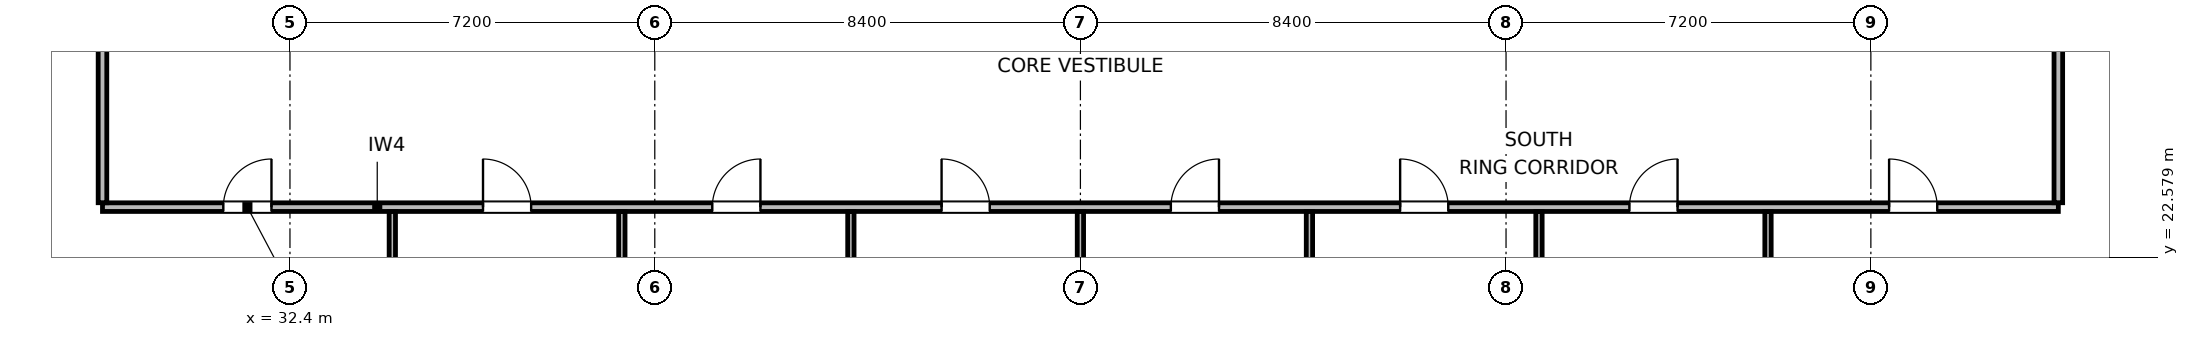
"""IFC4 building model, lengths in metres.
Left out: names, types, materials, properties, quantities, classifications, styles, units other than length and angle.
Written with IfcOpenShell. Run it as: python <this file> out.ifc"""

import sys

from ifc_helpers import new_model, si_unit, direction, frame, frame_2d, origin, place, context, subcontext, project, spatial, rectangle, extrude, element, fill, save


model = new_model("IFC4")
c1 = context("Model", 3, precision=1e-05, world=origin(), true_north=direction((0.0, 1.0)))
c2 = subcontext(c1, "Body", "Model", "MODEL_VIEW")
j1 = project(units=[si_unit("LENGTHUNIT", "METRE"), si_unit("PLANEANGLEUNIT", "RADIAN")], contexts=[c1])
p1 = place(None, origin())
s1 = spatial("IfcSite", under=j1, at=p1, CompositionType="ELEMENT")
p2 = place(p1, origin())
s2 = spatial("IfcBuilding", under=s1, at=p2, CompositionType="ELEMENT")
p3 = place(p2, frame((0.0, 0.0, 109.2)))
s3 = spatial("IfcBuildingStorey", under=s2, at=p3, CompositionType="ELEMENT", Elevation=109.2)
p4 = place(p3, frame((28.7, 23.57, 0.0), z_axis=(0.0, 0.0, 1.0), x_axis=(1.0, 0.0, 0.0)))
e1 = element("IfcWall", 1, at=p4, inside=s3, PredefinedType="PARTITIONING", context=c2, shape_type="SweptSolid", body=[
    extrude(rectangle(XDim=38.6, YDim=0.17, at=frame_2d((19.3, 0.0))), origin(), (0.0, 0.0, 1.0), 3.64),
])
p5 = place(p4, frame((2.385, 0.0, 0.0)))
e2 = element("IfcOpeningElement", 2, at=p5, cuts=e1, PredefinedType="OPENING", context=c2, shape_type="SweptSolid", body=[
    extrude(rectangle(XDim=0.95, YDim=2.04, at=frame_2d((0.475, 1.02))), frame((0.0, 0.095, 0.0), z_axis=(0.0, -1.0, 0.0), x_axis=(1.0, 0.0, 0.0)), (0.0, 0.0, 1.0), 0.19),
])
p6 = place(p4, frame((7.51, 0.0, 0.0)))
e3 = element("IfcOpeningElement", 3, at=p6, cuts=e1, PredefinedType="OPENING", context=c2, shape_type="SweptSolid", body=[
    extrude(rectangle(XDim=0.95, YDim=2.04, at=frame_2d((0.475, 1.02))), frame((0.0, 0.095, 0.0), z_axis=(0.0, -1.0, 0.0), x_axis=(1.0, 0.0, 0.0)), (0.0, 0.0, 1.0), 0.19),
])
p7 = place(p4, frame((12.035, 0.0, 0.0)))
e4 = element("IfcOpeningElement", 4, at=p7, cuts=e1, PredefinedType="OPENING", context=c2, shape_type="SweptSolid", body=[
    extrude(rectangle(XDim=0.95, YDim=2.04, at=frame_2d((0.475, 1.02))), frame((0.0, 0.095, 0.0), z_axis=(0.0, -1.0, 0.0), x_axis=(1.0, 0.0, 0.0)), (0.0, 0.0, 1.0), 0.19),
])
p8 = place(p4, frame((16.56, 0.0, 0.0)))
e5 = element("IfcOpeningElement", 5, at=p8, cuts=e1, PredefinedType="OPENING", context=c2, shape_type="SweptSolid", body=[
    extrude(rectangle(XDim=0.95, YDim=2.04, at=frame_2d((0.475, 1.02))), frame((0.0, 0.095, 0.0), z_axis=(0.0, -1.0, 0.0), x_axis=(1.0, 0.0, 0.0)), (0.0, 0.0, 1.0), 0.19),
])
p9 = place(p4, frame((21.085, 0.0, 0.0)))
e6 = element("IfcOpeningElement", 6, at=p9, cuts=e1, PredefinedType="OPENING", context=c2, shape_type="SweptSolid", body=[
    extrude(rectangle(XDim=0.95, YDim=2.04, at=frame_2d((0.475, 1.02))), frame((0.0, 0.095, 0.0), z_axis=(0.0, -1.0, 0.0), x_axis=(1.0, 0.0, 0.0)), (0.0, 0.0, 1.0), 0.19),
])
p10 = place(p4, frame((25.61, 0.0, 0.0)))
e7 = element("IfcOpeningElement", 7, at=p10, cuts=e1, PredefinedType="OPENING", context=c2, shape_type="SweptSolid", body=[
    extrude(rectangle(XDim=0.95, YDim=2.04, at=frame_2d((0.475, 1.02))), frame((0.0, 0.095, 0.0), z_axis=(0.0, -1.0, 0.0), x_axis=(1.0, 0.0, 0.0)), (0.0, 0.0, 1.0), 0.19),
])
p11 = place(p4, frame((30.135, 0.0, 0.0)))
e8 = element("IfcOpeningElement", 8, at=p11, cuts=e1, PredefinedType="OPENING", context=c2, shape_type="SweptSolid", body=[
    extrude(rectangle(XDim=0.95, YDim=2.04, at=frame_2d((0.475, 1.02))), frame((0.0, 0.095, 0.0), z_axis=(0.0, -1.0, 0.0), x_axis=(1.0, 0.0, 0.0)), (0.0, 0.0, 1.0), 0.19),
])
p12 = place(p4, frame((35.26, 0.0, 0.0)))
e9 = element("IfcOpeningElement", 9, at=p12, cuts=e1, PredefinedType="OPENING", context=c2, shape_type="SweptSolid", body=[
    extrude(rectangle(XDim=0.95, YDim=2.04, at=frame_2d((0.475, 1.02))), frame((0.0, 0.095, 0.0), z_axis=(0.0, -1.0, 0.0), x_axis=(1.0, 0.0, 0.0)), (0.0, 0.0, 1.0), 0.19),
])
p13 = place(p3, frame((28.7, 23.657, 0.0), z_axis=(0.0, 0.0, 1.0), x_axis=(0.0, 1.0, 0.0)))
e10 = element("IfcWall", 10, at=p13, inside=s3, PredefinedType="PARTITIONING", context=c2, shape_type="SweptSolid", body=[
    extrude(rectangle(XDim=24.686, YDim=0.17, at=frame_2d((12.343, 0.0))), origin(), (0.0, 0.0, 1.0), 3.64),
])
p14 = place(p13, frame((5.253, 0.0, 0.0)))
e11 = element("IfcOpeningElement", 11, at=p14, cuts=e10, PredefinedType="OPENING", context=c2, shape_type="SweptSolid", body=[
    extrude(rectangle(XDim=0.95, YDim=2.04, at=frame_2d((0.475, 1.02))), frame((0.0, 0.095, 0.0), z_axis=(0.0, -1.0, 0.0), x_axis=(1.0, 0.0, 0.0)), (0.0, 0.0, 1.0), 0.19),
])
p15 = place(p13, frame((17.683, 0.0, 0.0)))
e12 = element("IfcOpeningElement", 12, at=p15, cuts=e10, PredefinedType="OPENING", context=c2, shape_type="SweptSolid", body=[
    extrude(rectangle(XDim=0.95, YDim=2.04, at=frame_2d((0.475, 1.02))), frame((0.0, 0.095, 0.0), z_axis=(0.0, -1.0, 0.0), x_axis=(1.0, 0.0, 0.0)), (0.0, 0.0, 1.0), 0.19),
])
p16 = place(p3, frame((67.3, 23.657, 0.0), z_axis=(0.0, 0.0, 1.0), x_axis=(0.0, 1.0, 0.0)))
e13 = element("IfcWall", 13, at=p16, inside=s3, PredefinedType="PARTITIONING", context=c2, shape_type="SweptSolid", body=[
    extrude(rectangle(XDim=24.686, YDim=0.17, at=frame_2d((12.343, 0.0))), origin(), (0.0, 0.0, 1.0), 3.64),
])
p17 = place(p16, frame((5.153, 0.0, 0.0)))
e14 = element("IfcOpeningElement", 14, at=p17, cuts=e13, PredefinedType="OPENING", context=c2, shape_type="SweptSolid", body=[
    extrude(rectangle(XDim=0.95, YDim=2.04, at=frame_2d((0.475, 1.02))), frame((0.0, 0.095, 0.0), z_axis=(0.0, -1.0, 0.0), x_axis=(1.0, 0.0, 0.0)), (0.0, 0.0, 1.0), 0.19),
])
p18 = place(p16, frame((17.583, 0.0, 0.0)))
e15 = element("IfcOpeningElement", 15, at=p18, cuts=e13, PredefinedType="OPENING", context=c2, shape_type="SweptSolid", body=[
    extrude(rectangle(XDim=0.95, YDim=2.04, at=frame_2d((0.475, 1.02))), frame((0.0, 0.095, 0.0), z_axis=(0.0, -1.0, 0.0), x_axis=(1.0, 0.0, 0.0)), (0.0, 0.0, 1.0), 0.19),
])
for number, where, z_axis, x_axis in (
    (16, (34.42, 9.915, 0.0), (0.0, 0.0, 1.0), (0.0, 1.0, 0.0)),
    (17, (38.95, 9.915, 0.0), (0.0, 0.0, 1.0), (0.0, 1.0, 0.0)),
):
    element("IfcWall", number, at=place(p3, frame(where, z_axis=z_axis, x_axis=x_axis)), inside=s3, PredefinedType="PARTITIONING", context=c2, shape_type="SweptSolid", body=[
        extrude(rectangle(XDim=13.568, YDim=0.125, at=frame_2d((6.784, 0.0))), origin(), (0.0, 0.0, 1.0), 3.64),
    ])
p19 = place(p3, frame((43.47, 13.575, 0.0), z_axis=(0.0, 0.0, 1.0), x_axis=(0.0, 1.0, 0.0)))
e18 = element("IfcWall", 18, at=p19, inside=s3, PredefinedType="PARTITIONING", context=c2, shape_type="SweptSolid", body=[
    extrude(rectangle(XDim=9.908, YDim=0.125, at=frame_2d((4.954, 0.0))), origin(), (0.0, 0.0, 1.0), 3.003),
])
p20 = place(p3, frame((48.0, 11.515, 0.0), z_axis=(0.0, 0.0, 1.0), x_axis=(0.0, 1.0, 0.0)))
e19 = element("IfcWall", 19, at=p20, inside=s3, PredefinedType="PARTITIONING", context=c2, shape_type="SweptSolid", body=[
    extrude(rectangle(XDim=11.968, YDim=0.125, at=frame_2d((5.984, 0.0))), origin(), (0.0, 0.0, 1.0), 3.003),
])
p21 = place(p3, frame((52.52, 11.223, 0.0), z_axis=(0.0, 0.0, 1.0), x_axis=(0.0, 1.0, 0.0)))
e20 = element("IfcWall", 20, at=p21, inside=s3, PredefinedType="PARTITIONING", context=c2, shape_type="SweptSolid", body=[
    extrude(rectangle(XDim=12.26, YDim=0.125, at=frame_2d((6.13, 0.0))), origin(), (0.0, 0.0, 1.0), 3.003),
])
for number, where, z_axis, x_axis in (
    (21, (57.05, 9.915, 0.0), (0.0, 0.0, 1.0), (0.0, 1.0, 0.0)),
    (22, (61.57, 9.915, 0.0), (0.0, 0.0, 1.0), (0.0, 1.0, 0.0)),
):
    element("IfcWall", number, at=place(p3, frame(where, z_axis=z_axis, x_axis=x_axis)), inside=s3, PredefinedType="PARTITIONING", context=c2, shape_type="SweptSolid", body=[
        extrude(rectangle(XDim=13.568, YDim=0.125, at=frame_2d((6.784, 0.0))), origin(), (0.0, 0.0, 1.0), 3.64),
    ])
p22 = place(p5, origin())
e23 = element("IfcDoor", 23, at=p22, inside=s3, OperationType="SINGLE_SWING_RIGHT", PredefinedType="DOOR", context=c2, shape_type="SweptSolid", body=[
    extrude(rectangle(XDim=0.95, YDim=2.04, at=frame_2d((0.475, 1.02))), frame((0.0, 0.025, 0.0), z_axis=(0.0, -1.0, 0.0), x_axis=(1.0, 0.0, 0.0)), (0.0, 0.0, 1.0), 0.05),
])
fill(e2, e23)
p23 = place(p6, origin())
e24 = element("IfcDoor", 24, at=p23, inside=s3, OperationType="SINGLE_SWING_LEFT", PredefinedType="DOOR", context=c2, shape_type="SweptSolid", body=[
    extrude(rectangle(XDim=0.95, YDim=2.04, at=frame_2d((0.475, 1.02))), frame((0.0, 0.025, 0.0), z_axis=(0.0, -1.0, 0.0), x_axis=(1.0, 0.0, 0.0)), (0.0, 0.0, 1.0), 0.05),
])
fill(e3, e24)
p24 = place(p7, origin())
e25 = element("IfcDoor", 25, at=p24, inside=s3, OperationType="SINGLE_SWING_RIGHT", PredefinedType="DOOR", context=c2, shape_type="SweptSolid", body=[
    extrude(rectangle(XDim=0.95, YDim=2.04, at=frame_2d((0.475, 1.02))), frame((0.0, 0.025, 0.0), z_axis=(0.0, -1.0, 0.0), x_axis=(1.0, 0.0, 0.0)), (0.0, 0.0, 1.0), 0.05),
])
fill(e4, e25)
p25 = place(p8, origin())
e26 = element("IfcDoor", 26, at=p25, inside=s3, OperationType="SINGLE_SWING_LEFT", PredefinedType="DOOR", context=c2, shape_type="SweptSolid", body=[
    extrude(rectangle(XDim=0.95, YDim=2.04, at=frame_2d((0.475, 1.02))), frame((0.0, 0.025, 0.0), z_axis=(0.0, -1.0, 0.0), x_axis=(1.0, 0.0, 0.0)), (0.0, 0.0, 1.0), 0.05),
])
fill(e5, e26)
p26 = place(p9, origin())
e27 = element("IfcDoor", 27, at=p26, inside=s3, OperationType="SINGLE_SWING_RIGHT", PredefinedType="DOOR", context=c2, shape_type="SweptSolid", body=[
    extrude(rectangle(XDim=0.95, YDim=2.04, at=frame_2d((0.475, 1.02))), frame((0.0, 0.025, 0.0), z_axis=(0.0, -1.0, 0.0), x_axis=(1.0, 0.0, 0.0)), (0.0, 0.0, 1.0), 0.05),
])
fill(e6, e27)
p27 = place(p10, origin())
e28 = element("IfcDoor", 28, at=p27, inside=s3, OperationType="SINGLE_SWING_LEFT", PredefinedType="DOOR", context=c2, shape_type="SweptSolid", body=[
    extrude(rectangle(XDim=0.95, YDim=2.04, at=frame_2d((0.475, 1.02))), frame((0.0, 0.025, 0.0), z_axis=(0.0, -1.0, 0.0), x_axis=(1.0, 0.0, 0.0)), (0.0, 0.0, 1.0), 0.05),
])
fill(e7, e28)
p28 = place(p11, origin())
e29 = element("IfcDoor", 29, at=p28, inside=s3, OperationType="SINGLE_SWING_RIGHT", PredefinedType="DOOR", context=c2, shape_type="SweptSolid", body=[
    extrude(rectangle(XDim=0.95, YDim=2.04, at=frame_2d((0.475, 1.02))), frame((0.0, 0.025, 0.0), z_axis=(0.0, -1.0, 0.0), x_axis=(1.0, 0.0, 0.0)), (0.0, 0.0, 1.0), 0.05),
])
fill(e8, e29)
p29 = place(p12, origin())
e30 = element("IfcDoor", 30, at=p29, inside=s3, OperationType="SINGLE_SWING_LEFT", PredefinedType="DOOR", context=c2, shape_type="SweptSolid", body=[
    extrude(rectangle(XDim=0.95, YDim=2.04, at=frame_2d((0.475, 1.02))), frame((0.0, 0.025, 0.0), z_axis=(0.0, -1.0, 0.0), x_axis=(1.0, 0.0, 0.0)), (0.0, 0.0, 1.0), 0.05),
])
fill(e9, e30)
save(model, sys.argv[1])
